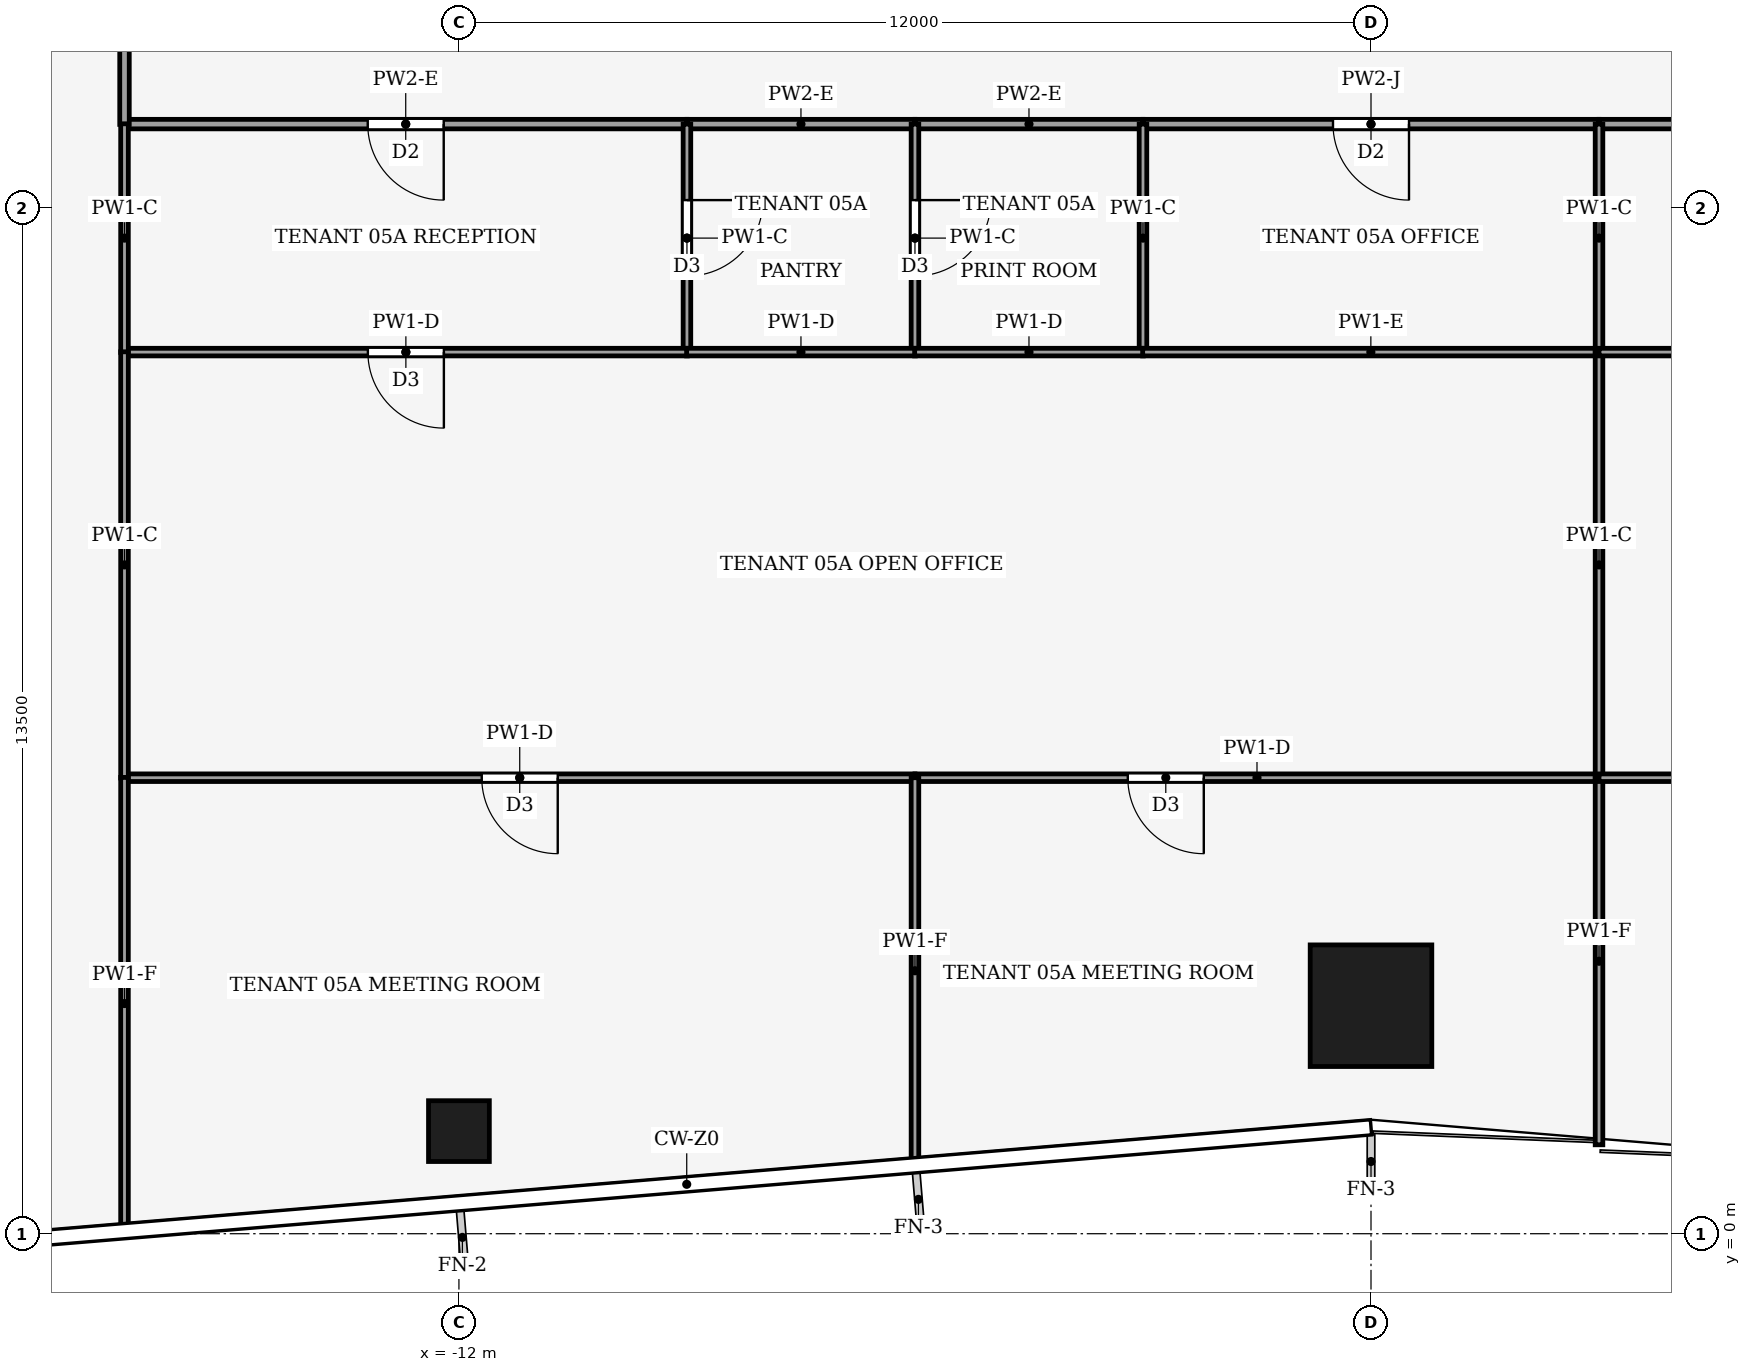
"""IFC4 building model, lengths in metres.
Left out: names, types, materials, properties, quantities, classifications, styles, units other than length and angle.
Written with IfcOpenShell. Run it as: python <this file> out.ifc"""

import sys

from ifc_helpers import new_model, si_unit, direction, frame, frame_2d, origin, origin_2d, place, context, subcontext, project, spatial, rectangle, hollow_rectangle, extrude, element, fill, save


model = new_model("IFC4")
c1 = context("Model", 3, precision=1e-05, world=origin(), true_north=direction((0.0, 1.0)))
c2 = subcontext(c1, "Body", "Model", "MODEL_VIEW")
j1 = project(units=[si_unit("LENGTHUNIT", "METRE"), si_unit("PLANEANGLEUNIT", "RADIAN")], contexts=[c1])
p1 = place(None, origin())
s1 = spatial("IfcSite", under=j1, at=p1, CompositionType="ELEMENT")
p2 = place(p1, origin())
s2 = spatial("IfcBuilding", under=s1, at=p2, CompositionType="ELEMENT")
p3 = place(p2, frame((0.0, 0.0, 26.0)))
s3 = spatial("IfcBuildingStorey", under=s2, at=p3, CompositionType="ELEMENT", Elevation=26.0)
p4 = place(p3, frame((0.0, 3.0, 0.0), z_axis=(0.0, 0.0, 1.0), x_axis=(1.0, 0.0, 0.0)))
e1 = element("IfcColumn", 1, at=p4, inside=s3, PredefinedType="COLUMN", context=c2, shape_type="SweptSolid", body=[
    extrude(hollow_rectangle(XDim=1.6, YDim=1.6, WallThickness=0.09, at=origin_2d()), origin(), (0.0, 0.0, 1.0), 4.0),
])
p5 = place(p3, frame((-12.0, 1.35, 0.0), z_axis=(0.0, 0.0, 1.0), x_axis=(1.0, 0.0, 0.0)))
e2 = element("IfcColumn", 2, at=p5, inside=s3, PredefinedType="COLUMN", context=c2, shape_type="SweptSolid", body=[
    extrude(hollow_rectangle(XDim=0.8, YDim=0.8, WallThickness=0.04, at=origin_2d()), origin(), (0.0, 0.0, 1.0), 4.0),
])
p6 = place(p3, frame((-9.0, 14.6, 0.0), z_axis=(0.0, 0.0, 1.0), x_axis=(-1.0, 0.0, 0.0)))
e3 = element("IfcWall", 3, at=p6, inside=s3, PredefinedType="PARTITIONING", context=c2, shape_type="SweptSolid", body=[
    extrude(rectangle(XDim=7.4, YDim=0.125, at=frame_2d((3.7, 0.0))), origin(), (0.0, 0.0, 1.0), 3.29),
])
p7 = place(p6, frame((3.2, 0.0, 0.0)))
e4 = element("IfcOpeningElement", 4, at=p7, cuts=e3, PredefinedType="OPENING", context=c2, shape_type="SweptSolid", body=[
    extrude(rectangle(XDim=1.0, YDim=2.1, at=frame_2d((0.5, 1.05))), frame((0.0, 0.073, 0.0), z_axis=(0.0, -1.0, 0.0), x_axis=(1.0, 0.0, 0.0)), (0.0, 0.0, 1.0), 0.145),
])
for number, where, z_axis, x_axis in (
    (5, (-9.0, 14.6, 0.0), (0.0, 0.0, 1.0), (1.0, 0.0, 0.0)),
    (6, (-6.0, 14.6, 0.0), (0.0, 0.0, 1.0), (1.0, 0.0, 0.0)),
):
    element("IfcWall", number, at=place(p3, frame(where, z_axis=z_axis, x_axis=x_axis)), inside=s3, PredefinedType="PARTITIONING", context=c2, shape_type="SweptSolid", body=[
        extrude(rectangle(XDim=3.0, YDim=0.125, at=frame_2d((1.5, 0.0))), origin(), (0.0, 0.0, 1.0), 3.29),
    ])
p8 = place(p3, frame((3.0, 14.6, 0.0), z_axis=(0.0, 0.0, 1.0), x_axis=(-1.0, 0.0, 0.0)))
e7 = element("IfcWall", 7, at=p8, inside=s3, PredefinedType="PARTITIONING", context=c2, shape_type="SweptSolid", body=[
    extrude(rectangle(XDim=6.0, YDim=0.125, at=frame_2d((3.0, 0.0))), origin(), (0.0, 0.0, 1.0), 3.34),
])
p9 = place(p8, frame((2.5, 0.0, 0.0)))
e8 = element("IfcOpeningElement", 8, at=p9, cuts=e7, PredefinedType="OPENING", context=c2, shape_type="SweptSolid", body=[
    extrude(rectangle(XDim=1.0, YDim=2.1, at=frame_2d((0.5, 1.05))), frame((0.0, 0.073, 0.0), z_axis=(0.0, -1.0, 0.0), x_axis=(1.0, 0.0, 0.0)), (0.0, 0.0, 1.0), 0.145),
])
p10 = place(p3, frame((9.0, 14.6, 0.0), z_axis=(0.0, 0.0, 1.0), x_axis=(-1.0, 0.0, 0.0)))
e9 = element("IfcWall", 9, at=p10, inside=s3, PredefinedType="PARTITIONING", context=c2, shape_type="SweptSolid", body=[
    extrude(rectangle(XDim=6.0, YDim=0.125, at=frame_2d((3.0, 0.0))), origin(), (0.0, 0.0, 1.0), 3.29),
])
p11 = place(p10, frame((2.5, 0.0, 0.0)))
e10 = element("IfcOpeningElement", 10, at=p11, cuts=e9, PredefinedType="OPENING", context=c2, shape_type="SweptSolid", body=[
    extrude(rectangle(XDim=1.0, YDim=2.1, at=frame_2d((0.5, 1.05))), frame((0.0, 0.073, 0.0), z_axis=(0.0, -1.0, 0.0), x_axis=(1.0, 0.0, 0.0)), (0.0, 0.0, 1.0), 0.145),
])
p12 = place(p3, frame((-16.4, 14.596, 0.0), z_axis=(0.0, 0.0, 1.0), x_axis=(0.0, 1.0, 0.0)))
e11 = element("IfcWall", 11, at=p12, inside=s3, PredefinedType="PARTITIONING", context=c2, shape_type="SweptSolid", body=[
    extrude(rectangle(XDim=9.404, YDim=0.125, at=frame_2d((4.702, 0.0))), origin(), (0.0, 0.0, 1.0), 3.14),
])
p13 = place(p12, frame((4.202, 0.0, 0.0)))
e12 = element("IfcOpeningElement", 12, at=p13, cuts=e11, PredefinedType="OPENING", context=c2, shape_type="SweptSolid", body=[
    extrude(rectangle(XDim=1.0, YDim=2.1, at=frame_2d((0.5, 1.05))), frame((0.0, 0.073, 0.0), z_axis=(0.0, -1.0, 0.0), x_axis=(1.0, 0.0, 0.0)), (0.0, 0.0, 1.0), 0.145),
])
p14 = place(p3, frame((-9.0, 14.6, 0.0), z_axis=(0.0, 0.0, 1.0), x_axis=(0.0, -1.0, 0.0)))
e13 = element("IfcWall", 13, at=p14, inside=s3, PredefinedType="PARTITIONING", context=c2, shape_type="SweptSolid", body=[
    extrude(rectangle(XDim=3.0, YDim=0.1, at=frame_2d((1.5, 0.0))), origin(), (0.0, 0.0, 1.0), 3.87),
])
p15 = place(p14, frame((1.0, 0.0, 0.0)))
e14 = element("IfcOpeningElement", 14, at=p15, cuts=e13, PredefinedType="OPENING", context=c2, shape_type="SweptSolid", body=[
    extrude(rectangle(XDim=1.0, YDim=2.1, at=frame_2d((0.5, 1.05))), frame((0.0, 0.06, 0.0), z_axis=(0.0, -1.0, 0.0), x_axis=(1.0, 0.0, 0.0)), (0.0, 0.0, 1.0), 0.12),
])
p16 = place(p3, frame((-8.996, 11.6, 0.0), z_axis=(0.0, 0.0, 1.0), x_axis=(-1.0, 0.0, 0.0)))
e15 = element("IfcWall", 15, at=p16, inside=s3, PredefinedType="PARTITIONING", context=c2, shape_type="SweptSolid", body=[
    extrude(rectangle(XDim=7.404, YDim=0.1, at=frame_2d((3.702, 0.0))), origin(), (0.0, 0.0, 1.0), 3.29),
])
p17 = place(p16, frame((3.202, 0.0, 0.0)))
e16 = element("IfcOpeningElement", 16, at=p17, cuts=e15, PredefinedType="OPENING", context=c2, shape_type="SweptSolid", body=[
    extrude(rectangle(XDim=1.0, YDim=2.1, at=frame_2d((0.5, 1.05))), frame((0.0, 0.06, 0.0), z_axis=(0.0, -1.0, 0.0), x_axis=(1.0, 0.0, 0.0)), (0.0, 0.0, 1.0), 0.12),
])
p18 = place(p3, frame((-16.4, 14.604, 0.0), z_axis=(0.0, 0.0, 1.0), x_axis=(0.0, -1.0, 0.0)))
e17 = element("IfcWall", 17, at=p18, inside=s3, PredefinedType="PARTITIONING", context=c2, shape_type="SweptSolid", body=[
    extrude(rectangle(XDim=3.008, YDim=0.1, at=frame_2d((1.504, 0.0))), origin(), (0.0, 0.0, 1.0), 3.87),
])
p19 = place(p3, frame((-6.0, 14.6, 0.0), z_axis=(0.0, 0.0, 1.0), x_axis=(0.0, -1.0, 0.0)))
e18 = element("IfcWall", 18, at=p19, inside=s3, PredefinedType="PARTITIONING", context=c2, shape_type="SweptSolid", body=[
    extrude(rectangle(XDim=3.0, YDim=0.1, at=frame_2d((1.5, 0.0))), origin(), (0.0, 0.0, 1.0), 3.87),
])
p20 = place(p19, frame((1.0, 0.0, 0.0)))
e19 = element("IfcOpeningElement", 19, at=p20, cuts=e18, PredefinedType="OPENING", context=c2, shape_type="SweptSolid", body=[
    extrude(rectangle(XDim=1.0, YDim=2.1, at=frame_2d((0.5, 1.05))), frame((0.0, 0.06, 0.0), z_axis=(0.0, -1.0, 0.0), x_axis=(1.0, 0.0, 0.0)), (0.0, 0.0, 1.0), 0.12),
])
p21 = place(p3, frame((-9.004, 11.6, 0.0), z_axis=(0.0, 0.0, 1.0), x_axis=(1.0, 0.0, 0.0)))
e20 = element("IfcWall", 20, at=p21, inside=s3, PredefinedType="PARTITIONING", context=c2, shape_type="SweptSolid", body=[
    extrude(rectangle(XDim=3.008, YDim=0.1, at=frame_2d((1.504, 0.0))), origin(), (0.0, 0.0, 1.0), 3.29),
])
p22 = place(p3, frame((-3.0, 11.6, 0.0), z_axis=(0.0, 0.0, 1.0), x_axis=(0.0, 1.0, 0.0)))
e21 = element("IfcWall", 21, at=p22, inside=s3, PredefinedType="PARTITIONING", context=c2, shape_type="SweptSolid", body=[
    extrude(rectangle(XDim=3.0, YDim=0.1, at=frame_2d((1.5, 0.0))), origin(), (0.0, 0.0, 1.0), 3.87),
])
p23 = place(p3, frame((-6.004, 11.6, 0.0), z_axis=(0.0, 0.0, 1.0), x_axis=(1.0, 0.0, 0.0)))
e22 = element("IfcWall", 22, at=p23, inside=s3, PredefinedType="PARTITIONING", context=c2, shape_type="SweptSolid", body=[
    extrude(rectangle(XDim=3.008, YDim=0.1, at=frame_2d((1.504, 0.0))), origin(), (0.0, 0.0, 1.0), 3.29),
])
p24 = place(p3, frame((-3.004, 11.6, 0.0), z_axis=(0.0, 0.0, 1.0), x_axis=(1.0, 0.0, 0.0)))
e23 = element("IfcWall", 23, at=p24, inside=s3, PredefinedType="PARTITIONING", context=c2, shape_type="SweptSolid", body=[
    extrude(rectangle(XDim=6.004, YDim=0.1, at=frame_2d((3.002, 0.0))), origin(), (0.0, 0.0, 1.0), 3.34),
])
p25 = place(p3, frame((3.0, 11.6, 0.0), z_axis=(0.0, 0.0, 1.0), x_axis=(0.0, 1.0, 0.0)))
e24 = element("IfcWall", 24, at=p25, inside=s3, PredefinedType="PARTITIONING", context=c2, shape_type="SweptSolid", body=[
    extrude(rectangle(XDim=3.0, YDim=0.1, at=frame_2d((1.5, 0.0))), origin(), (0.0, 0.0, 1.0), 3.87),
])
p26 = place(p3, frame((-6.0, 6.0, 0.0), z_axis=(0.0, 0.0, 1.0), x_axis=(-1.0, 0.0, 0.0)))
e25 = element("IfcWall", 25, at=p26, inside=s3, PredefinedType="PARTITIONING", context=c2, shape_type="SweptSolid", body=[
    extrude(rectangle(XDim=10.4, YDim=0.1, at=frame_2d((5.2, 0.0))), origin(), (0.0, 0.0, 1.0), 3.29),
])
p27 = place(p26, frame((4.7, 0.0, 0.0)))
e26 = element("IfcOpeningElement", 26, at=p27, cuts=e25, PredefinedType="OPENING", context=c2, shape_type="SweptSolid", body=[
    extrude(rectangle(XDim=1.0, YDim=2.1, at=frame_2d((0.5, 1.05))), frame((0.0, 0.06, 0.0), z_axis=(0.0, -1.0, 0.0), x_axis=(1.0, 0.0, 0.0)), (0.0, 0.0, 1.0), 0.12),
])
p28 = place(p3, frame((3.0, 6.0, 0.0), z_axis=(0.0, 0.0, 1.0), x_axis=(-1.0, 0.0, 0.0)))
e27 = element("IfcWall", 27, at=p28, inside=s3, PredefinedType="PARTITIONING", context=c2, shape_type="SweptSolid", body=[
    extrude(rectangle(XDim=9.0, YDim=0.1, at=frame_2d((4.5, 0.0))), origin(), (0.0, 0.0, 1.0), 3.29),
])
p29 = place(p28, frame((5.2, 0.0, 0.0)))
e28 = element("IfcOpeningElement", 28, at=p29, cuts=e27, PredefinedType="OPENING", context=c2, shape_type="SweptSolid", body=[
    extrude(rectangle(XDim=1.0, YDim=2.1, at=frame_2d((0.5, 1.05))), frame((0.0, 0.06, 0.0), z_axis=(0.0, -1.0, 0.0), x_axis=(1.0, 0.0, 0.0)), (0.0, 0.0, 1.0), 0.12),
])
p30 = place(p3, frame((3.0, 6.0, 0.0), z_axis=(0.0, 0.0, 1.0), x_axis=(0.0, 1.0, 0.0)))
e29 = element("IfcWall", 29, at=p30, inside=s3, PredefinedType="PARTITIONING", context=c2, shape_type="SweptSolid", body=[
    extrude(rectangle(XDim=5.6, YDim=0.1, at=frame_2d((2.8, 0.0))), origin(), (0.0, 0.0, 1.0), 3.87),
])
p31 = place(p3, frame((-16.4, 11.604, 0.0), z_axis=(0.0, 0.0, 1.0), x_axis=(0.0, -1.0, 0.0)))
e30 = element("IfcWall", 30, at=p31, inside=s3, PredefinedType="PARTITIONING", context=c2, shape_type="SweptSolid", body=[
    extrude(rectangle(XDim=5.608, YDim=0.1, at=frame_2d((2.804, 0.0))), origin(), (0.0, 0.0, 1.0), 3.87),
])
p32 = place(p3, frame((-6.0, 0.92, 0.0), z_axis=(0.0, 0.0, 1.0), x_axis=(0.0, 1.0, 0.0)))
e31 = element("IfcWall", 31, at=p32, inside=s3, PredefinedType="PARTITIONING", context=c2, shape_type="SweptSolid", body=[
    extrude(rectangle(XDim=5.08, YDim=0.1, at=frame_2d((2.54, 0.0))), origin(), (0.0, 0.0, 1.0), 3.04),
])
p33 = place(p3, frame((-16.4, 6.004, 0.0), z_axis=(0.0, 0.0, 1.0), x_axis=(0.0, -1.0, 0.0)))
e32 = element("IfcWall", 32, at=p33, inside=s3, PredefinedType="PARTITIONING", context=c2, shape_type="SweptSolid", body=[
    extrude(rectangle(XDim=5.951, YDim=0.1, at=frame_2d((2.975, 0.0))), origin(), (0.0, 0.0, 1.0), 3.04),
])
p34 = place(p3, frame((3.0, 1.17, 0.0), z_axis=(0.0, 0.0, 1.0), x_axis=(0.0, 1.0, 0.0)))
e33 = element("IfcWall", 33, at=p34, inside=s3, PredefinedType="PARTITIONING", context=c2, shape_type="SweptSolid", body=[
    extrude(rectangle(XDim=4.83, YDim=0.1, at=frame_2d((2.415, 0.0))), origin(), (0.0, 0.0, 1.0), 3.04),
])
p35 = place(p3, frame((9.004, 11.6, 0.0), z_axis=(0.0, 0.0, 1.0), x_axis=(-1.0, 0.0, 0.0)))
e34 = element("IfcWall", 34, at=p35, inside=s3, PredefinedType="PARTITIONING", context=c2, shape_type="SweptSolid", body=[
    extrude(rectangle(XDim=6.004, YDim=0.1, at=frame_2d((3.002, 0.0))), origin(), (0.0, 0.0, 1.0), 3.29),
])
p36 = place(p35, frame((2.502, 0.0, 0.0)))
e35 = element("IfcOpeningElement", 35, at=p36, cuts=e34, PredefinedType="OPENING", context=c2, shape_type="SweptSolid", body=[
    extrude(rectangle(XDim=1.0, YDim=2.1, at=frame_2d((0.5, 1.05))), frame((0.0, 0.06, 0.0), z_axis=(0.0, -1.0, 0.0), x_axis=(1.0, 0.0, 0.0)), (0.0, 0.0, 1.0), 0.12),
])
p37 = place(p3, frame((9.0, 6.0, 0.0), z_axis=(0.0, 0.0, 1.0), x_axis=(-1.0, 0.0, 0.0)))
e36 = element("IfcWall", 36, at=p37, inside=s3, PredefinedType="PARTITIONING", context=c2, shape_type="SweptSolid", body=[
    extrude(rectangle(XDim=6.0, YDim=0.1, at=frame_2d((3.0, 0.0))), origin(), (0.0, 0.0, 1.0), 3.29),
])
p38 = place(p37, frame((2.5, 0.0, 0.0)))
e37 = element("IfcOpeningElement", 37, at=p38, cuts=e36, PredefinedType="OPENING", context=c2, shape_type="SweptSolid", body=[
    extrude(rectangle(XDim=1.0, YDim=2.1, at=frame_2d((0.5, 1.05))), frame((0.0, 0.06, 0.0), z_axis=(0.0, -1.0, 0.0), x_axis=(1.0, 0.0, 0.0)), (0.0, 0.0, 1.0), 0.12),
])
p39 = place(p7, origin())
e38 = element("IfcDoor", 38, at=p39, inside=s3, OperationType="SINGLE_SWING_LEFT", PredefinedType="DOOR", context=c2, shape_type="SweptSolid", body=[
    extrude(rectangle(XDim=1.0, YDim=2.1, at=frame_2d((0.5, 1.05))), frame((0.0, 0.025, 0.0), z_axis=(0.0, -1.0, 0.0), x_axis=(1.0, 0.0, 0.0)), (0.0, 0.0, 1.0), 0.05),
])
fill(e4, e38)
p40 = place(p9, origin())
e39 = element("IfcDoor", 39, at=p40, inside=s3, OperationType="SINGLE_SWING_RIGHT", PredefinedType="DOOR", context=c2, shape_type="SweptSolid", body=[
    extrude(rectangle(XDim=1.0, YDim=2.1, at=frame_2d((0.5, 1.05))), frame((0.0, 0.025, 0.0), z_axis=(0.0, -1.0, 0.0), x_axis=(1.0, 0.0, 0.0)), (0.0, 0.0, 1.0), 0.05),
])
fill(e8, e39)
p41 = place(p15, origin())
e40 = element("IfcDoor", 40, at=p41, inside=s3, OperationType="SINGLE_SWING_RIGHT", PredefinedType="DOOR", context=c2, shape_type="SweptSolid", body=[
    extrude(rectangle(XDim=1.0, YDim=2.1, at=frame_2d((0.5, 1.05))), frame((0.0, 0.025, 0.0), z_axis=(0.0, -1.0, 0.0), x_axis=(1.0, 0.0, 0.0)), (0.0, 0.0, 1.0), 0.05),
])
fill(e14, e40)
p42 = place(p17, origin())
e41 = element("IfcDoor", 41, at=p42, inside=s3, OperationType="SINGLE_SWING_LEFT", PredefinedType="DOOR", context=c2, shape_type="SweptSolid", body=[
    extrude(rectangle(XDim=1.0, YDim=2.1, at=frame_2d((0.5, 1.05))), frame((0.0, 0.025, 0.0), z_axis=(0.0, -1.0, 0.0), x_axis=(1.0, 0.0, 0.0)), (0.0, 0.0, 1.0), 0.05),
])
fill(e16, e41)
p43 = place(p20, origin())
e42 = element("IfcDoor", 42, at=p43, inside=s3, OperationType="SINGLE_SWING_RIGHT", PredefinedType="DOOR", context=c2, shape_type="SweptSolid", body=[
    extrude(rectangle(XDim=1.0, YDim=2.1, at=frame_2d((0.5, 1.05))), frame((0.0, 0.025, 0.0), z_axis=(0.0, -1.0, 0.0), x_axis=(1.0, 0.0, 0.0)), (0.0, 0.0, 1.0), 0.05),
])
fill(e19, e42)
p44 = place(p27, origin())
e43 = element("IfcDoor", 43, at=p44, inside=s3, OperationType="SINGLE_SWING_LEFT", PredefinedType="DOOR", context=c2, shape_type="SweptSolid", body=[
    extrude(rectangle(XDim=1.0, YDim=2.1, at=frame_2d((0.5, 1.05))), frame((0.0, 0.025, 0.0), z_axis=(0.0, -1.0, 0.0), x_axis=(1.0, 0.0, 0.0)), (0.0, 0.0, 1.0), 0.05),
])
fill(e26, e43)
p45 = place(p29, origin())
e44 = element("IfcDoor", 44, at=p45, inside=s3, OperationType="SINGLE_SWING_RIGHT", PredefinedType="DOOR", context=c2, shape_type="SweptSolid", body=[
    extrude(rectangle(XDim=1.0, YDim=2.1, at=frame_2d((0.5, 1.05))), frame((0.0, 0.025, 0.0), z_axis=(0.0, -1.0, 0.0), x_axis=(1.0, 0.0, 0.0)), (0.0, 0.0, 1.0), 0.05),
])
fill(e28, e44)
save(model, sys.argv[1])
